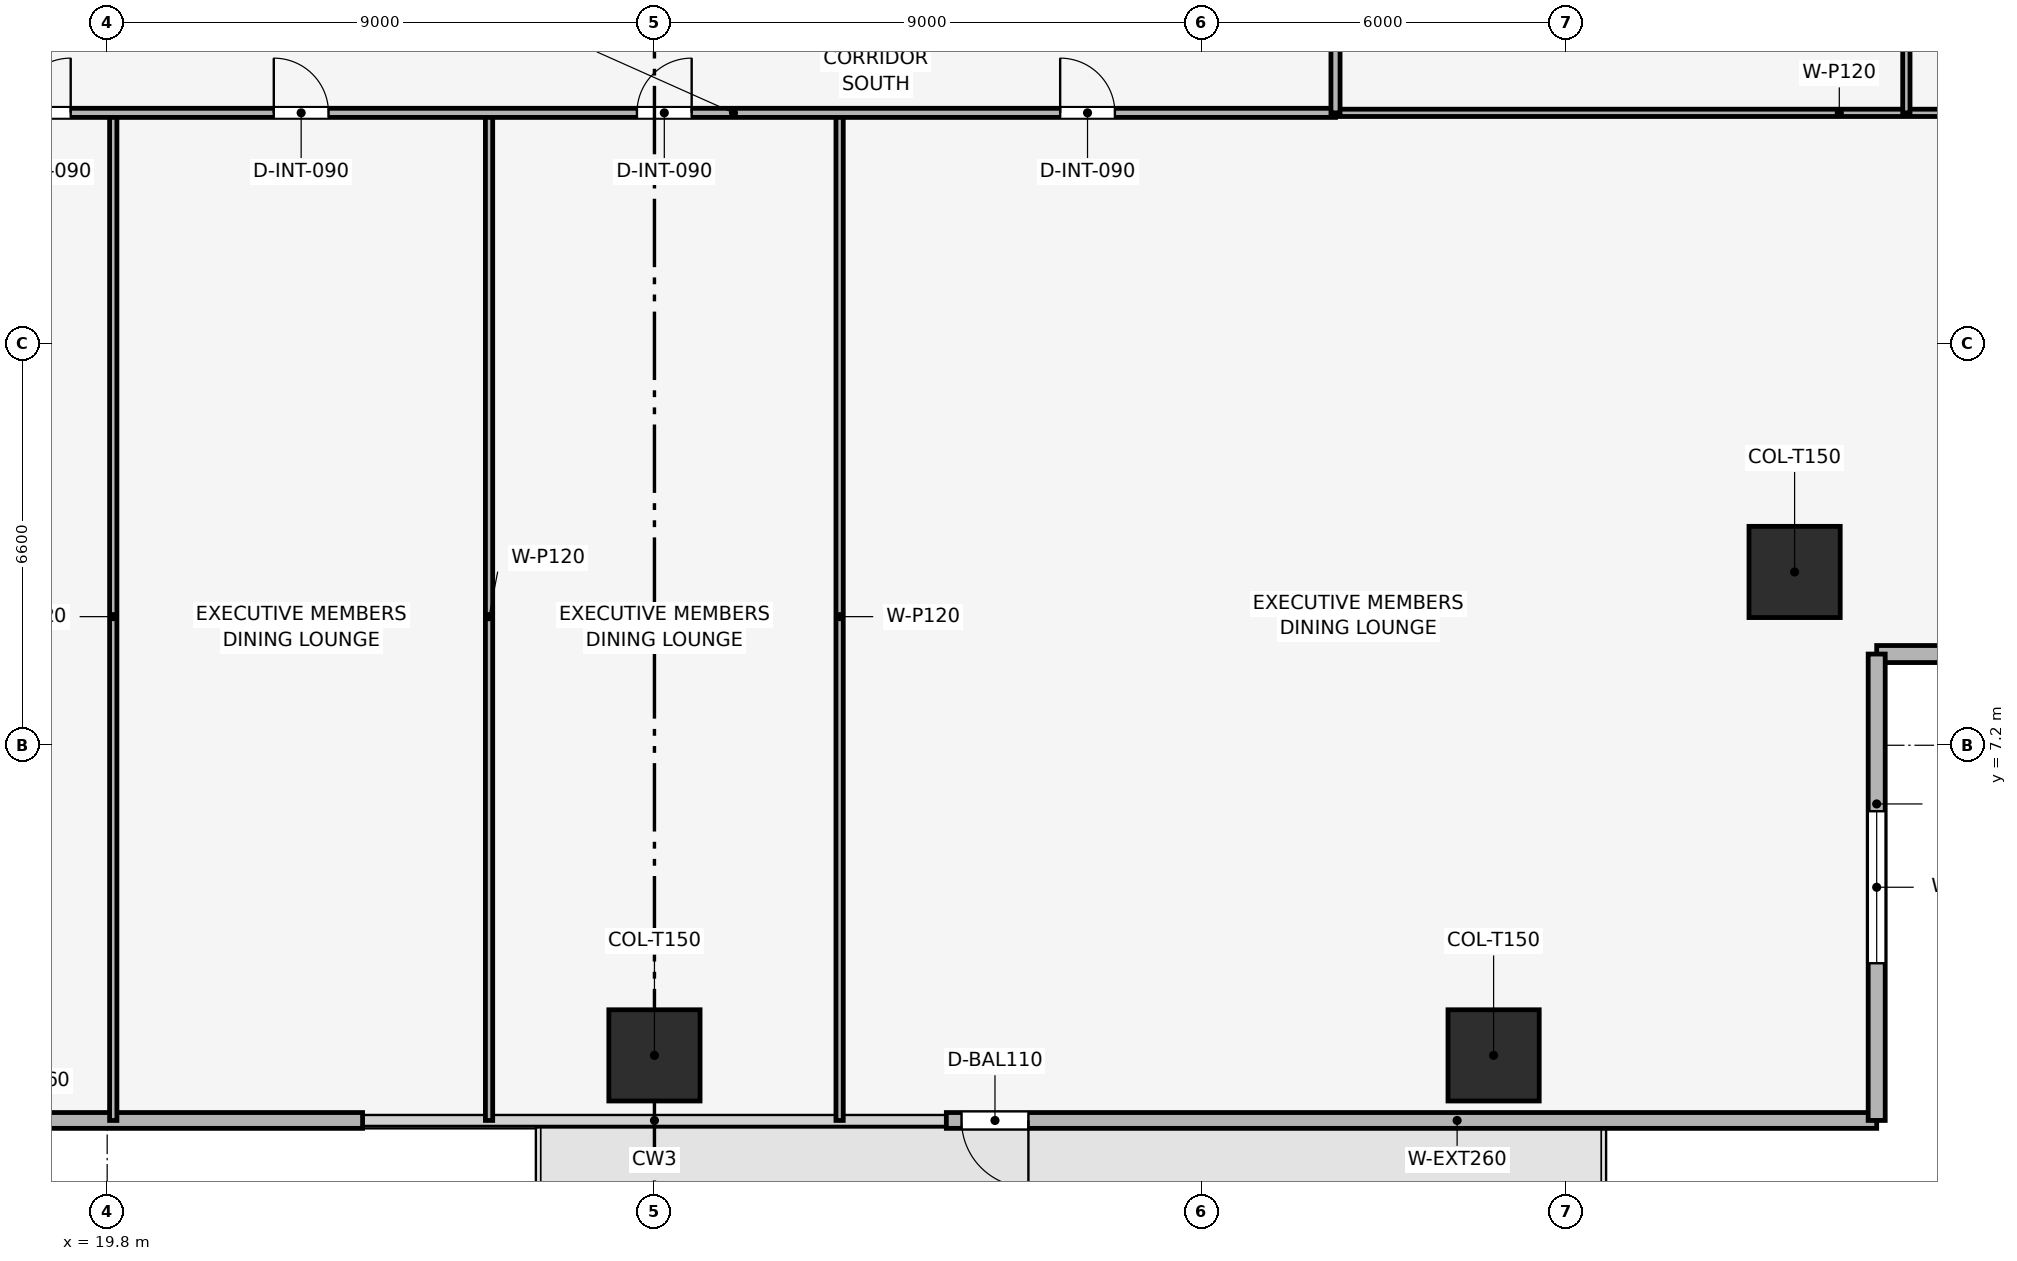
"""IFC4 building model, lengths in metres.
Left out: names, types, materials, properties, quantities, classifications, styles, units other than length and angle.
Written with IfcOpenShell. Run it as: python <this file> out.ifc"""

import sys

from ifc_helpers import new_model, si_unit, direction, frame, frame_2d, origin, origin_2d, place, context, subcontext, project, spatial, rectangle, extrude, element, fill, save


model = new_model("IFC4")
c1 = context("Model", 3, precision=1e-05, world=origin(), true_north=direction((0.0, 1.0)))
c2 = subcontext(c1, "Body", "Model", "MODEL_VIEW")
j1 = project(units=[si_unit("LENGTHUNIT", "METRE"), si_unit("PLANEANGLEUNIT", "RADIAN")], contexts=[c1])
p1 = place(None, origin())
s1 = spatial("IfcSite", under=j1, at=p1, CompositionType="ELEMENT")
p2 = place(p1, origin())
s2 = spatial("IfcBuilding", under=s1, at=p2, CompositionType="ELEMENT")
p3 = place(p2, frame((0.0, 0.0, 96.3)))
s3 = spatial("IfcBuildingStorey", under=s2, at=p3, CompositionType="ELEMENT", Elevation=96.3)
for number, where, z_axis, x_axis in (
    (1, (28.8, 2.1, 0.003), (0.0, 0.0, 1.0), (1.0, 0.0, 0.0)),
    (2, (42.6, 2.1, 0.003), (0.0, 0.0, 1.0), (1.0, 0.0, 0.0)),
    (3, (47.55, 10.05, 0.003), (0.0, 0.0, 1.0), (1.0, 0.0, 0.0)),
):
    element("IfcColumn", number, at=place(p3, frame(where, z_axis=z_axis, x_axis=x_axis)), inside=s3, PredefinedType="COLUMN", context=c2, shape_type="SweptSolid", body=[
        extrude(rectangle(XDim=1.5, YDim=1.5, at=origin_2d()), origin(), (0.0, 0.0, 1.0), 3.644),
    ])
p4 = place(p3, frame((48.9, 1.03, 0.0), z_axis=(0.0, 0.0, 1.0), x_axis=(-1.0, 0.0, 0.0)))
e4 = element("IfcWall", 4, at=p4, inside=s3, PredefinedType="SOLIDWALL", context=c2, shape_type="SweptSolid", body=[
    extrude(rectangle(XDim=15.3, YDim=0.26, at=frame_2d((7.65, 0.0))), origin(), (0.0, 0.0, 1.0), 3.65),
])
p5 = place(p4, frame((13.95, 0.0, 0.0)))
e5 = element("IfcOpeningElement", 5, at=p5, cuts=e4, PredefinedType="OPENING", context=c2, shape_type="SweptSolid", body=[
    extrude(rectangle(XDim=1.1, YDim=2.2, at=frame_2d((0.55, 1.1))), frame((0.0, 0.14, 0.0), z_axis=(0.0, -1.0, 0.0), x_axis=(1.0, 0.0, 0.0)), (0.0, 0.0, 1.0), 0.28),
])
p6 = place(p3, frame((24.0, 1.03, 0.0), z_axis=(0.0, 0.0, 1.0), x_axis=(-1.0, 0.0, 0.0)))
e6 = element("IfcWall", 6, at=p6, inside=s3, PredefinedType="SOLIDWALL", context=c2, shape_type="SweptSolid", body=[
    extrude(rectangle(XDim=15.3, YDim=0.26, at=frame_2d((7.65, 0.0))), origin(), (0.0, 0.0, 1.0), 3.65),
])
p7 = place(p6, frame((11.25, 0.0, 0.9)))
e7 = element("IfcOpeningElement", 7, at=p7, cuts=e6, PredefinedType="OPENING", context=c2, shape_type="SweptSolid", body=[
    extrude(rectangle(XDim=3.8, YDim=1.9, at=frame_2d((1.9, 0.95))), frame((0.0, 0.14, 0.0), z_axis=(0.0, -1.0, 0.0), x_axis=(1.0, 0.0, 0.0)), (0.0, 0.0, 1.0), 0.28),
])
p8 = place(p3, frame((56.57, 8.7, 0.0), z_axis=(0.0, 0.0, 1.0), x_axis=(-1.0, 0.0, 0.0)))
e8 = element("IfcWall", 8, at=p8, inside=s3, PredefinedType="SOLIDWALL", context=c2, shape_type="SweptSolid", body=[
    extrude(rectangle(XDim=7.67, YDim=0.28, at=frame_2d((3.835, 0.0))), origin(), (0.0, 0.0, 1.0), 3.65),
])
p9 = place(p8, frame((2.585, 0.0, 0.9)))
e9 = element("IfcOpeningElement", 9, at=p9, cuts=e8, PredefinedType="OPENING", context=c2, shape_type="SweptSolid", body=[
    extrude(rectangle(XDim=2.5, YDim=1.9, at=frame_2d((1.25, 0.95))), frame((0.0, 0.15, 0.0), z_axis=(0.0, -1.0, 0.0), x_axis=(1.0, 0.0, 0.0)), (0.0, 0.0, 1.0), 0.3),
])
p10 = place(p3, frame((48.9, 8.7, 0.0), z_axis=(0.0, 0.0, 1.0), x_axis=(0.0, -1.0, 0.0)))
e10 = element("IfcWall", 10, at=p10, inside=s3, PredefinedType="SOLIDWALL", context=c2, shape_type="SweptSolid", body=[
    extrude(rectangle(XDim=7.67, YDim=0.28, at=frame_2d((3.835, 0.0))), origin(), (0.0, 0.0, 1.0), 3.65),
])
p11 = place(p10, frame((2.585, 0.0, 0.9)))
e11 = element("IfcOpeningElement", 11, at=p11, cuts=e10, PredefinedType="OPENING", context=c2, shape_type="SweptSolid", body=[
    extrude(rectangle(XDim=2.5, YDim=1.9, at=frame_2d((1.25, 0.95))), frame((0.0, 0.15, 0.0), z_axis=(0.0, -1.0, 0.0), x_axis=(1.0, 0.0, 0.0)), (0.0, 0.0, 1.0), 0.3),
])
for number, where, z_axis, x_axis in (
    (12, (19.9, 1.03, 0.0), (0.0, 0.0, 1.0), (0.0, 1.0, 0.0)),
    (13, (26.08, 1.03, 0.0), (0.0, 0.0, 1.0), (0.0, 1.0, 0.0)),
    (14, (31.845, 1.03, 0.0), (0.0, 0.0, 1.0), (0.0, 1.0, 0.0)),
    (15, (40.0, 17.6, 0.0), (0.0, 0.0, 1.0), (1.0, 0.0, 0.0)),
):
    element("IfcWall", number, at=place(p3, frame(where, z_axis=z_axis, x_axis=x_axis)), inside=s3, PredefinedType="PARTITIONING", context=c2, shape_type="SweptSolid", body=[
        extrude(rectangle(XDim=16.57, YDim=0.12, at=frame_2d((8.285, 0.0))), origin(), (0.0, 0.0, 1.0), 2.935),
    ])
p12 = place(p3, frame((49.388, 17.6, 0.0), z_axis=(0.0, 0.0, 1.0), x_axis=(0.0, 1.0, 0.0)))
e16 = element("IfcWall", 16, at=p12, inside=s3, PredefinedType="PARTITIONING", context=c2, shape_type="SweptSolid", body=[
    extrude(rectangle(XDim=6.038, YDim=0.12, at=frame_2d((3.019, 0.0))), origin(), (0.0, 0.0, 1.0), 3.085),
])
p13 = place(p12, frame((3.753, 0.0, 0.0)))
e17 = element("IfcOpeningElement", 17, at=p13, cuts=e16, PredefinedType="OPENING", context=c2, shape_type="SweptSolid", body=[
    extrude(rectangle(XDim=0.9, YDim=2.1, at=frame_2d((0.45, 1.05))), frame((0.0, 0.07, 0.0), z_axis=(0.0, -1.0, 0.0), x_axis=(1.0, 0.0, 0.0)), (0.0, 0.0, 1.0), 0.14),
])
p14 = place(p3, frame((17.6, 17.6, 0.0), z_axis=(0.0, 0.0, 1.0), x_axis=(1.0, 0.0, 0.0)))
e18 = element("IfcWall", 18, at=p14, inside=s3, PredefinedType="PARTITIONING", context=c2, shape_type="SweptSolid", body=[
    extrude(rectangle(XDim=22.4, YDim=0.15, at=frame_2d((11.2, 0.0))), origin(), (0.0, 0.0, 1.0), 3.085),
])
p15 = place(p14, frame((0.7, 0.0, 0.0)))
e19 = element("IfcOpeningElement", 19, at=p15, cuts=e18, PredefinedType="OPENING", context=c2, shape_type="SweptSolid", body=[
    extrude(rectangle(XDim=0.9, YDim=2.1, at=frame_2d((0.45, 1.05))), frame((0.0, 0.085, 0.0), z_axis=(0.0, -1.0, 0.0), x_axis=(1.0, 0.0, 0.0)), (0.0, 0.0, 1.0), 0.17),
])
p16 = place(p14, frame((4.94, 0.0, 0.0)))
e20 = element("IfcOpeningElement", 20, at=p16, cuts=e18, PredefinedType="OPENING", context=c2, shape_type="SweptSolid", body=[
    extrude(rectangle(XDim=0.9, YDim=2.1, at=frame_2d((0.45, 1.05))), frame((0.0, 0.085, 0.0), z_axis=(0.0, -1.0, 0.0), x_axis=(1.0, 0.0, 0.0)), (0.0, 0.0, 1.0), 0.17),
])
p17 = place(p14, frame((10.912, 0.0, 0.0)))
e21 = element("IfcOpeningElement", 21, at=p17, cuts=e18, PredefinedType="OPENING", context=c2, shape_type="SweptSolid", body=[
    extrude(rectangle(XDim=0.9, YDim=2.1, at=frame_2d((0.45, 1.05))), frame((0.0, 0.085, 0.0), z_axis=(0.0, -1.0, 0.0), x_axis=(1.0, 0.0, 0.0)), (0.0, 0.0, 1.0), 0.17),
])
p18 = place(p14, frame((17.872, 0.0, 0.0)))
e22 = element("IfcOpeningElement", 22, at=p18, cuts=e18, PredefinedType="OPENING", context=c2, shape_type="SweptSolid", body=[
    extrude(rectangle(XDim=0.9, YDim=2.1, at=frame_2d((0.45, 1.05))), frame((0.0, 0.085, 0.0), z_axis=(0.0, -1.0, 0.0), x_axis=(1.0, 0.0, 0.0)), (0.0, 0.0, 1.0), 0.17),
])
p19 = place(p3, frame((40.0, 17.6, 0.0), z_axis=(0.0, 0.0, 1.0), x_axis=(0.0, 1.0, 0.0)))
e23 = element("IfcWall", 23, at=p19, inside=s3, PredefinedType="PARTITIONING", context=c2, shape_type="SweptSolid", body=[
    extrude(rectangle(XDim=22.4, YDim=0.15, at=frame_2d((11.2, 0.0))), origin(), (0.0, 0.0, 1.0), 3.085),
])
p20 = place(p19, frame((2.569, 0.0, 0.0)))
e24 = element("IfcOpeningElement", 24, at=p20, cuts=e23, PredefinedType="OPENING", context=c2, shape_type="SweptSolid", body=[
    extrude(rectangle(XDim=0.9, YDim=2.1, at=frame_2d((0.45, 1.05))), frame((0.0, 0.085, 0.0), z_axis=(0.0, -1.0, 0.0), x_axis=(1.0, 0.0, 0.0)), (0.0, 0.0, 1.0), 0.17),
])
p21 = place(p19, frame((13.769, 0.0, 0.0)))
e25 = element("IfcOpeningElement", 25, at=p21, cuts=e23, PredefinedType="OPENING", context=c2, shape_type="SweptSolid", body=[
    extrude(rectangle(XDim=0.9, YDim=2.1, at=frame_2d((0.45, 1.05))), frame((0.0, 0.085, 0.0), z_axis=(0.0, -1.0, 0.0), x_axis=(1.0, 0.0, 0.0)), (0.0, 0.0, 1.0), 0.17),
])
p22 = place(p5, origin())
e26 = element("IfcDoor", 26, at=p22, inside=s3, OperationType="SINGLE_SWING_LEFT", PredefinedType="DOOR", context=c2, shape_type="SweptSolid", body=[
    extrude(rectangle(XDim=1.1, YDim=2.2, at=frame_2d((0.55, 1.1))), frame((0.0, 0.025, 0.0), z_axis=(0.0, -1.0, 0.0), x_axis=(1.0, 0.0, 0.0)), (0.0, 0.0, 1.0), 0.05),
])
fill(e5, e26)
p23 = place(p11, origin())
e27 = element("IfcWindow", 27, at=p23, inside=s3, PartitioningType="SINGLE_PANEL", PredefinedType="WINDOW", context=c2, shape_type="SweptSolid", body=[
    extrude(rectangle(XDim=2.5, YDim=1.9, at=frame_2d((1.25, 0.95))), frame((0.0, 0.03, 0.0), z_axis=(0.0, -1.0, 0.0), x_axis=(1.0, 0.0, 0.0)), (0.0, 0.0, 1.0), 0.06),
])
fill(e11, e27)
p24 = place(p15, origin())
e28 = element("IfcDoor", 28, at=p24, inside=s3, OperationType="SINGLE_SWING_RIGHT", PredefinedType="DOOR", context=c2, shape_type="SweptSolid", body=[
    extrude(rectangle(XDim=0.9, YDim=2.1, at=frame_2d((0.45, 1.05))), frame((0.0, 0.025, 0.0), z_axis=(0.0, -1.0, 0.0), x_axis=(1.0, 0.0, 0.0)), (0.0, 0.0, 1.0), 0.05),
])
fill(e19, e28)
p25 = place(p16, origin())
e29 = element("IfcDoor", 29, at=p25, inside=s3, OperationType="SINGLE_SWING_LEFT", PredefinedType="DOOR", context=c2, shape_type="SweptSolid", body=[
    extrude(rectangle(XDim=0.9, YDim=2.1, at=frame_2d((0.45, 1.05))), frame((0.0, 0.025, 0.0), z_axis=(0.0, -1.0, 0.0), x_axis=(1.0, 0.0, 0.0)), (0.0, 0.0, 1.0), 0.05),
])
fill(e20, e29)
p26 = place(p17, origin())
e30 = element("IfcDoor", 30, at=p26, inside=s3, OperationType="SINGLE_SWING_RIGHT", PredefinedType="DOOR", context=c2, shape_type="SweptSolid", body=[
    extrude(rectangle(XDim=0.9, YDim=2.1, at=frame_2d((0.45, 1.05))), frame((0.0, 0.025, 0.0), z_axis=(0.0, -1.0, 0.0), x_axis=(1.0, 0.0, 0.0)), (0.0, 0.0, 1.0), 0.05),
])
fill(e21, e30)
p27 = place(p18, origin())
e31 = element("IfcDoor", 31, at=p27, inside=s3, OperationType="SINGLE_SWING_LEFT", PredefinedType="DOOR", context=c2, shape_type="SweptSolid", body=[
    extrude(rectangle(XDim=0.9, YDim=2.1, at=frame_2d((0.45, 1.05))), frame((0.0, 0.025, 0.0), z_axis=(0.0, -1.0, 0.0), x_axis=(1.0, 0.0, 0.0)), (0.0, 0.0, 1.0), 0.05),
])
fill(e22, e31)
save(model, sys.argv[1])
